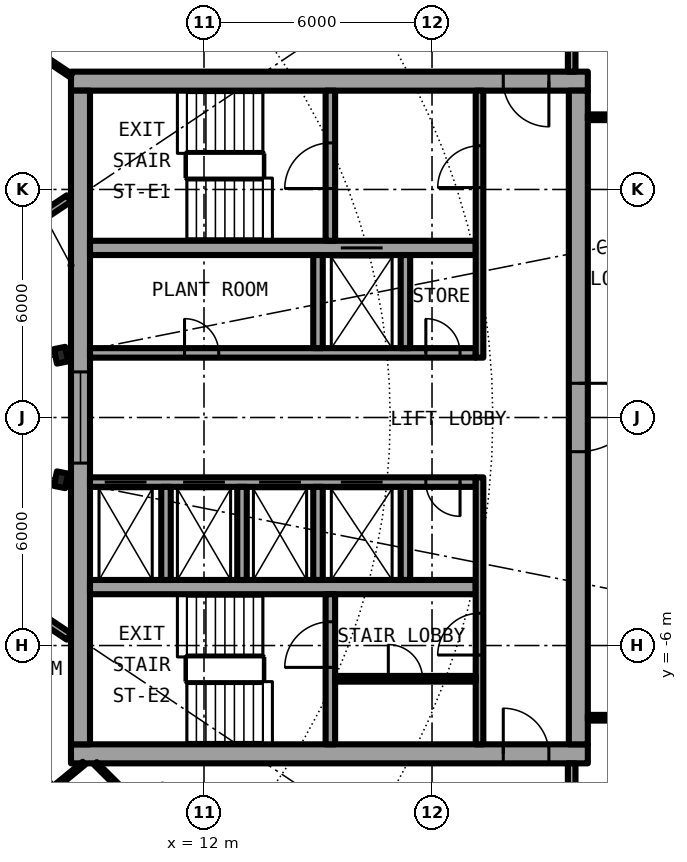
"""IFC4 building model, lengths in metres.
Left out: names, types, materials, properties, quantities, classifications, styles, units other than length and angle.
Written with IfcOpenShell. Run it as: python <this file> out.ifc"""

import sys

from ifc_helpers import new_model, si_unit, direction, frame, frame_2d, origin, origin_2d, place, context, subcontext, project, spatial, rectangle, i_section, extrude, element, fill, save


model = new_model("IFC4")
c1 = context("Model", 3, precision=1e-05, world=origin(), true_north=direction((0.0, 1.0)))
c2 = subcontext(c1, "Body", "Model", "MODEL_VIEW")
j1 = project(units=[si_unit("LENGTHUNIT", "METRE"), si_unit("PLANEANGLEUNIT", "RADIAN")], contexts=[c1])
p1 = place(None, origin())
s1 = spatial("IfcSite", under=j1, at=p1, CompositionType="ELEMENT")
p2 = place(p1, origin())
s2 = spatial("IfcBuilding", under=s1, at=p2, CompositionType="ELEMENT")
p3 = place(p2, frame((0.0, 0.0, 145.2)))
s3 = spatial("IfcBuildingStorey", under=s2, at=p3, CompositionType="ELEMENT", Elevation=145.2)
for number, where, z_axis, x_axis in (
    (1, (8.239, 1.639, 0.0), (0.0, 0.0, 1.0), (0.981, 0.195, 0.0)),
    (2, (8.239, -1.639, 0.0), (0.0, 0.0, 1.0), (0.981, -0.195, 0.0)),
):
    element("IfcColumn", number, at=place(p3, frame(where, z_axis=z_axis, x_axis=x_axis)), inside=s3, PredefinedType="COLUMN", context=c2, shape_type="SweptSolid", body=[
        extrude(i_section(OverallWidth=0.3, OverallDepth=0.39, WebThickness=0.011, FlangeThickness=0.019, FilletRadius=0.027, at=origin_2d()), origin(), (0.0, 0.0, 1.0), 3.05),
    ])
p4 = place(p3, frame((22.1, 8.85, 0.0), z_axis=(0.0, 0.0, 1.0), x_axis=(-1.0, 0.0, 0.0)))
e3 = element("IfcWall", 3, at=p4, inside=s3, PredefinedType="SHEAR", context=c2, shape_type="SweptSolid", body=[
    extrude(rectangle(XDim=13.6, YDim=0.5, at=frame_2d((6.8, 0.0))), origin(), (0.0, 0.0, 1.0), 3.05),
])
p5 = place(p4, frame((1.025, 0.0, 0.0)))
e4 = element("IfcOpeningElement", 4, at=p5, cuts=e3, PredefinedType="OPENING", context=c2, shape_type="SweptSolid", body=[
    extrude(rectangle(XDim=1.2, YDim=2.3, at=frame_2d((0.6, 1.15))), frame((0.0, 0.26, 0.0), z_axis=(0.0, -1.0, 0.0), x_axis=(1.0, 0.0, 0.0)), (0.0, 0.0, 1.0), 0.52),
])
p6 = place(p3, frame((8.5, -8.85, 0.0), z_axis=(0.0, 0.0, 1.0), x_axis=(1.0, 0.0, 0.0)))
e5 = element("IfcWall", 5, at=p6, inside=s3, PredefinedType="SHEAR", context=c2, shape_type="SweptSolid", body=[
    extrude(rectangle(XDim=13.6, YDim=0.5, at=frame_2d((6.8, 0.0))), origin(), (0.0, 0.0, 1.0), 3.05),
])
p7 = place(p6, frame((11.375, 0.0, 0.0)))
e6 = element("IfcOpeningElement", 6, at=p7, cuts=e5, PredefinedType="OPENING", context=c2, shape_type="SweptSolid", body=[
    extrude(rectangle(XDim=1.2, YDim=2.3, at=frame_2d((0.6, 1.15))), frame((0.0, 0.26, 0.0), z_axis=(0.0, -1.0, 0.0), x_axis=(1.0, 0.0, 0.0)), (0.0, 0.0, 1.0), 0.52),
])
p8 = place(p3, frame((21.85, 8.6, 0.0), z_axis=(0.0, 0.0, 1.0), x_axis=(0.0, -1.0, 0.0)))
e7 = element("IfcWall", 7, at=p8, inside=s3, PredefinedType="SHEAR", context=c2, shape_type="SweptSolid", body=[
    extrude(rectangle(XDim=17.2, YDim=0.5, at=frame_2d((8.6, 0.0))), origin(), (0.0, 0.0, 1.0), 3.05),
])
p9 = place(p8, frame((7.7, 0.0, 0.0)))
e8 = element("IfcOpeningElement", 8, at=p9, cuts=e7, PredefinedType="OPENING", context=c2, shape_type="SweptSolid", body=[
    extrude(rectangle(XDim=1.8, YDim=2.3, at=frame_2d((0.9, 1.15))), frame((0.0, 0.26, 0.0), z_axis=(0.0, -1.0, 0.0), x_axis=(1.0, 0.0, 0.0)), (0.0, 0.0, 1.0), 0.52),
])
p10 = place(p3, frame((8.75, -8.6, 0.0), z_axis=(0.0, 0.0, 1.0), x_axis=(0.0, 1.0, 0.0)))
e9 = element("IfcWall", 9, at=p10, inside=s3, PredefinedType="SHEAR", context=c2, shape_type="SweptSolid", body=[
    extrude(rectangle(XDim=17.2, YDim=0.5, at=frame_2d((8.6, 0.0))), origin(), (0.0, 0.0, 1.0), 3.05),
])
p11 = place(p10, frame((7.4, 0.0, 0.1)))
e10 = element("IfcOpeningElement", 10, at=p11, cuts=e9, PredefinedType="OPENING", context=c2, shape_type="SweptSolid", body=[
    extrude(rectangle(XDim=2.4, YDim=2.2, at=frame_2d((1.2, 1.1))), frame((0.0, 0.26, 0.0), z_axis=(0.0, -1.0, 0.0), x_axis=(1.0, 0.0, 0.0)), (0.0, 0.0, 1.0), 0.52),
])
p12 = place(p3, frame((9.0, 1.7, 0.0), z_axis=(0.0, 0.0, 1.0), x_axis=(1.0, 0.0, 0.0)))
e11 = element("IfcWall", 11, at=p12, inside=s3, PredefinedType="SHEAR", context=c2, shape_type="SweptSolid", body=[
    extrude(rectangle(XDim=10.15, YDim=0.25, at=frame_2d((5.075, 0.0))), origin(), (0.0, 0.0, 1.0), 3.05),
])
p13 = place(p12, frame((2.488, 0.0, 0.0)))
e12 = element("IfcOpeningElement", 12, at=p13, cuts=e11, PredefinedType="OPENING", context=c2, shape_type="SweptSolid", body=[
    extrude(rectangle(XDim=0.9, YDim=2.3, at=frame_2d((0.45, 1.15))), frame((0.0, 0.135, 0.0), z_axis=(0.0, -1.0, 0.0), x_axis=(1.0, 0.0, 0.0)), (0.0, 0.0, 1.0), 0.27),
])
p14 = place(p12, frame((8.837, 0.0, 0.0)))
e13 = element("IfcOpeningElement", 13, at=p14, cuts=e11, PredefinedType="OPENING", context=c2, shape_type="SweptSolid", body=[
    extrude(rectangle(XDim=0.9, YDim=2.3, at=frame_2d((0.45, 1.15))), frame((0.0, 0.135, 0.0), z_axis=(0.0, -1.0, 0.0), x_axis=(1.0, 0.0, 0.0)), (0.0, 0.0, 1.0), 0.27),
])
p15 = place(p3, frame((9.0, 4.462, 0.0), z_axis=(0.0, 0.0, 1.0), x_axis=(1.0, 0.0, 0.0)))
e14 = element("IfcWall", 14, at=p15, inside=s3, PredefinedType="SHEAR", context=c2, shape_type="SweptSolid", body=[
    extrude(rectangle(XDim=10.15, YDim=0.375, at=frame_2d((5.075, 0.0))), origin(), (0.0, 0.0, 1.0), 3.05),
])
p16 = place(p15, frame((6.6, 0.0, 0.0)))
e15 = element("IfcOpeningElement", 15, at=p16, cuts=e14, PredefinedType="OPENING", context=c2, shape_type="SweptSolid", body=[
    extrude(rectangle(XDim=1.1, YDim=2.3, at=frame_2d((0.55, 1.15))), frame((0.0, 0.198, 0.0), z_axis=(0.0, -1.0, 0.0), x_axis=(1.0, 0.0, 0.0)), (0.0, 0.0, 1.0), 0.395),
])
p17 = place(p3, frame((15.325, 4.65, 0.0), z_axis=(0.0, 0.0, 1.0), x_axis=(0.0, 1.0, 0.0)))
e16 = element("IfcWall", 16, at=p17, inside=s3, PredefinedType="SHEAR", context=c2, shape_type="SweptSolid", body=[
    extrude(rectangle(XDim=3.95, YDim=0.25, at=frame_2d((1.975, 0.0))), origin(), (0.0, 0.0, 1.0), 3.05),
])
p18 = place(p17, frame((1.375, 0.0, 0.0)))
e17 = element("IfcOpeningElement", 17, at=p18, cuts=e16, PredefinedType="OPENING", context=c2, shape_type="SweptSolid", body=[
    extrude(rectangle(XDim=1.2, YDim=2.3, at=frame_2d((0.6, 1.15))), frame((0.0, 0.135, 0.0), z_axis=(0.0, -1.0, 0.0), x_axis=(1.0, 0.0, 0.0)), (0.0, 0.0, 1.0), 0.27),
])
for number, where, z_axis, x_axis in (
    (18, (15.0, 1.825, 0.0), (0.0, 0.0, 1.0), (0.0, 1.0, 0.0)),
    (19, (17.3, 1.825, 0.0), (0.0, 0.0, 1.0), (0.0, 1.0, 0.0)),
):
    element("IfcWall", number, at=place(p3, frame(where, z_axis=z_axis, x_axis=x_axis)), inside=s3, PredefinedType="SOLIDWALL", context=c2, shape_type="SweptSolid", body=[
        extrude(rectangle(XDim=2.45, YDim=0.25, at=frame_2d((1.225, 0.0))), origin(), (0.0, 0.0, 1.0), 2.7),
    ])
p19 = place(p3, frame((19.25, 1.575, 0.0), z_axis=(0.0, 0.0, 1.0), x_axis=(0.0, 1.0, 0.0)))
e20 = element("IfcWall", 20, at=p19, inside=s3, PredefinedType="SOLIDWALL", context=c2, shape_type="SweptSolid", body=[
    extrude(rectangle(XDim=7.025, YDim=0.2, at=frame_2d((3.513, 0.0))), origin(), (0.0, 0.0, 1.0), 2.7),
])
p20 = place(p19, frame((4.475, 0.0, 0.0)))
e21 = element("IfcOpeningElement", 21, at=p20, cuts=e20, PredefinedType="OPENING", context=c2, shape_type="SweptSolid", body=[
    extrude(rectangle(XDim=1.1, YDim=2.3, at=frame_2d((0.55, 1.15))), frame((0.0, 0.11, 0.0), z_axis=(0.0, -1.0, 0.0), x_axis=(1.0, 0.0, 0.0)), (0.0, 0.0, 1.0), 0.22),
])
p21 = place(p3, frame((19.15, -1.7, 0.0), z_axis=(0.0, 0.0, 1.0), x_axis=(-1.0, 0.0, 0.0)))
e22 = element("IfcWall", 22, at=p21, inside=s3, PredefinedType="SHEAR", context=c2, shape_type="SweptSolid", body=[
    extrude(rectangle(XDim=10.15, YDim=0.25, at=frame_2d((5.075, 0.0))), origin(), (0.0, 0.0, 1.0), 3.05),
])
p22 = place(p21, frame((8.663, 0.0, 0.0)))
e23 = element("IfcOpeningElement", 23, at=p22, cuts=e22, PredefinedType="OPENING", context=c2, shape_type="SweptSolid", body=[
    extrude(rectangle(XDim=1.1, YDim=2.3, at=frame_2d((0.55, 1.15))), frame((0.0, 0.135, 0.0), z_axis=(0.0, -1.0, 0.0), x_axis=(1.0, 0.0, 0.0)), (0.0, 0.0, 1.0), 0.27),
])
p23 = place(p21, frame((6.6, 0.0, 0.0)))
e24 = element("IfcOpeningElement", 24, at=p23, cuts=e22, PredefinedType="OPENING", context=c2, shape_type="SweptSolid", body=[
    extrude(rectangle(XDim=1.1, YDim=2.3, at=frame_2d((0.55, 1.15))), frame((0.0, 0.135, 0.0), z_axis=(0.0, -1.0, 0.0), x_axis=(1.0, 0.0, 0.0)), (0.0, 0.0, 1.0), 0.27),
])
p24 = place(p21, frame((4.6, 0.0, 0.0)))
e25 = element("IfcOpeningElement", 25, at=p24, cuts=e22, PredefinedType="OPENING", context=c2, shape_type="SweptSolid", body=[
    extrude(rectangle(XDim=1.1, YDim=2.3, at=frame_2d((0.55, 1.15))), frame((0.0, 0.135, 0.0), z_axis=(0.0, -1.0, 0.0), x_axis=(1.0, 0.0, 0.0)), (0.0, 0.0, 1.0), 0.27),
])
p25 = place(p21, frame((2.45, 0.0, 0.0)))
e26 = element("IfcOpeningElement", 26, at=p25, cuts=e22, PredefinedType="OPENING", context=c2, shape_type="SweptSolid", body=[
    extrude(rectangle(XDim=1.1, YDim=2.3, at=frame_2d((0.55, 1.15))), frame((0.0, 0.135, 0.0), z_axis=(0.0, -1.0, 0.0), x_axis=(1.0, 0.0, 0.0)), (0.0, 0.0, 1.0), 0.27),
])
p26 = place(p21, frame((0.413, 0.0, 0.0)))
e27 = element("IfcOpeningElement", 27, at=p26, cuts=e22, PredefinedType="OPENING", context=c2, shape_type="SweptSolid", body=[
    extrude(rectangle(XDim=0.9, YDim=2.3, at=frame_2d((0.45, 1.15))), frame((0.0, 0.135, 0.0), z_axis=(0.0, -1.0, 0.0), x_axis=(1.0, 0.0, 0.0)), (0.0, 0.0, 1.0), 0.27),
])
p27 = place(p3, frame((9.0, -4.462, 0.0), z_axis=(0.0, 0.0, 1.0), x_axis=(1.0, 0.0, 0.0)))
e28 = element("IfcWall", 28, at=p27, inside=s3, PredefinedType="SHEAR", context=c2, shape_type="SweptSolid", body=[
    extrude(rectangle(XDim=10.15, YDim=0.375, at=frame_2d((5.075, 0.0))), origin(), (0.0, 0.0, 1.0), 3.05),
])
p28 = place(p3, frame((15.325, -8.6, 0.0), z_axis=(0.0, 0.0, 1.0), x_axis=(0.0, 1.0, 0.0)))
e29 = element("IfcWall", 29, at=p28, inside=s3, PredefinedType="SHEAR", context=c2, shape_type="SweptSolid", body=[
    extrude(rectangle(XDim=3.95, YDim=0.25, at=frame_2d((1.975, 0.0))), origin(), (0.0, 0.0, 1.0), 3.05),
])
p29 = place(p28, frame((2.025, 0.0, 0.0)))
e30 = element("IfcOpeningElement", 30, at=p29, cuts=e29, PredefinedType="OPENING", context=c2, shape_type="SweptSolid", body=[
    extrude(rectangle(XDim=1.2, YDim=2.3, at=frame_2d((0.6, 1.15))), frame((0.0, 0.135, 0.0), z_axis=(0.0, -1.0, 0.0), x_axis=(1.0, 0.0, 0.0)), (0.0, 0.0, 1.0), 0.27),
])
for number, where, z_axis, x_axis in (
    (31, (15.0, -1.825, 0.0), (0.0, 0.0, 1.0), (0.0, -1.0, 0.0)),
    (32, (17.3, -1.825, 0.0), (0.0, 0.0, 1.0), (0.0, -1.0, 0.0)),
):
    element("IfcWall", number, at=place(p3, frame(where, z_axis=z_axis, x_axis=x_axis)), inside=s3, PredefinedType="SOLIDWALL", context=c2, shape_type="SweptSolid", body=[
        extrude(rectangle(XDim=2.45, YDim=0.25, at=frame_2d((1.225, 0.0))), origin(), (0.0, 0.0, 1.0), 2.7),
    ])
p30 = place(p3, frame((19.25, -8.6, 0.0), z_axis=(0.0, 0.0, 1.0), x_axis=(0.0, 1.0, 0.0)))
e33 = element("IfcWall", 33, at=p30, inside=s3, PredefinedType="SOLIDWALL", context=c2, shape_type="SweptSolid", body=[
    extrude(rectangle(XDim=7.025, YDim=0.2, at=frame_2d((3.513, 0.0))), origin(), (0.0, 0.0, 1.0), 2.7),
])
p31 = place(p30, frame((2.35, 0.0, 0.0)))
e34 = element("IfcOpeningElement", 34, at=p31, cuts=e33, PredefinedType="OPENING", context=c2, shape_type="SweptSolid", body=[
    extrude(rectangle(XDim=1.1, YDim=2.3, at=frame_2d((0.55, 1.15))), frame((0.0, 0.11, 0.0), z_axis=(0.0, -1.0, 0.0), x_axis=(1.0, 0.0, 0.0)), (0.0, 0.0, 1.0), 0.22),
])
for number, where, z_axis, x_axis in (
    (35, (11.0, -1.825, 0.0), (0.0, 0.0, 1.0), (0.0, -1.0, 0.0)),
    (36, (13.0, -1.825, 0.0), (0.0, 0.0, 1.0), (0.0, -1.0, 0.0)),
):
    element("IfcWall", number, at=place(p3, frame(where, z_axis=z_axis, x_axis=x_axis)), inside=s3, PredefinedType="SOLIDWALL", context=c2, shape_type="SweptSolid", body=[
        extrude(rectangle(XDim=2.45, YDim=0.25, at=frame_2d((1.225, 0.0))), origin(), (0.0, 0.0, 1.0), 2.7),
    ])
p32 = place(p3, frame((15.45, -6.875, 0.0), z_axis=(0.0, 0.0, 1.0), x_axis=(1.0, 0.0, 0.0)))
e37 = element("IfcWall", 37, at=p32, inside=s3, PredefinedType="PARTITIONING", context=c2, shape_type="SweptSolid", body=[
    extrude(rectangle(XDim=3.7, YDim=0.15, at=frame_2d((1.85, 0.0))), origin(), (0.0, 0.0, 1.0), 2.7),
])
p33 = place(p32, frame((1.4, 0.0, 0.0)))
e38 = element("IfcOpeningElement", 38, at=p33, cuts=e37, PredefinedType="OPENING", context=c2, shape_type="SweptSolid", body=[
    extrude(rectangle(XDim=0.9, YDim=2.3, at=frame_2d((0.45, 1.15))), frame((0.0, 0.085, 0.0), z_axis=(0.0, -1.0, 0.0), x_axis=(1.0, 0.0, 0.0)), (0.0, 0.0, 1.0), 0.17),
])
for number, where, z_axis, x_axis in (
    (39, (22.1, -7.9, 0.0), (0.0, 0.0, 1.0), (1.0, 0.0, 0.0)),
    (40, (22.1, 7.9, 0.0), (0.0, 0.0, 1.0), (1.0, 0.0, 0.0)),
):
    element("IfcWall", number, at=place(p3, frame(where, z_axis=z_axis, x_axis=x_axis)), inside=s3, PredefinedType="PARTITIONING", context=c2, shape_type="SweptSolid", body=[
        extrude(rectangle(XDim=2.84, YDim=0.15, at=frame_2d((1.42, 0.0))), origin(), (0.0, 0.0, 1.0), 2.7),
    ])
for number, where, z_axis, x_axis in (
    (41, (21.675, -10.85, 0.0), (0.0, 0.0, 1.0), (0.0, 1.0, 0.0)),
    (42, (21.675, 9.1, 0.0), (0.0, 0.0, 1.0), (0.0, 1.0, 0.0)),
):
    element("IfcWall", number, at=place(p3, frame(where, z_axis=z_axis, x_axis=x_axis)), inside=s3, PredefinedType="PARTITIONING", context=c2, shape_type="SweptSolid", body=[
        extrude(rectangle(XDim=1.75, YDim=0.2, at=frame_2d((0.875, 0.0))), origin(), (0.0, 0.0, 1.0), 2.7),
    ])
p34 = place(p3, frame((8.016, -9.773, 0.0), z_axis=(0.0, 0.0, 1.0), x_axis=(0.7731800648, 0.634186555673, 0.0)))
e43 = element("IfcWall", 43, at=p34, inside=s3, PredefinedType="PARTITIONING", context=c2, shape_type="SweptSolid", body=[
    extrude(rectangle(XDim=1.064, YDim=0.1, at=frame_2d((0.532, 0.0))), origin(), (0.0, 0.0, 1.0), 2.7),
])
p35 = place(p3, frame((6.513, -4.472, 0.0), z_axis=(0.0, 0.0, 1.0), x_axis=(0.83133816625, -0.555766905579, 0.0)))
e44 = element("IfcWall", 44, at=p35, inside=s3, PredefinedType="PARTITIONING", context=c2, shape_type="SweptSolid", body=[
    extrude(rectangle(XDim=2.323, YDim=0.2, at=frame_2d((1.162, 0.0))), origin(), (0.0, 0.0, 1.0), 2.7),
])
p36 = place(p3, frame((4.898, -5.968, 0.0), z_axis=(0.0, 0.0, 1.0), x_axis=(0.634401778971, -0.773003481776, 0.0)))
e45 = element("IfcWall", 45, at=p36, inside=s3, PredefinedType="PARTITIONING", context=c2, shape_type="SweptSolid", body=[
    extrude(rectangle(XDim=4.92, YDim=0.1, at=frame_2d((2.46, 0.0))), origin(), (0.0, 0.0, 1.0), 2.7),
])
p37 = place(p36, frame((2.01, 0.0, 0.0)))
e46 = element("IfcOpeningElement", 46, at=p37, cuts=e45, PredefinedType="OPENING", context=c2, shape_type="SweptSolid", body=[
    extrude(rectangle(XDim=0.9, YDim=2.3, at=frame_2d((0.45, 1.15))), frame((0.0, 0.06, 0.0), z_axis=(0.0, -1.0, 0.0), x_axis=(1.0, 0.0, 0.0)), (0.0, 0.0, 1.0), 0.12),
])
p38 = place(p3, frame((9.144, -9.104, 0.0), z_axis=(0.0, 0.0, 1.0), x_axis=(0.708793214553, -0.705416316088, 0.0)))
e47 = element("IfcWall", 47, at=p38, inside=s3, PredefinedType="PARTITIONING", context=c2, shape_type="SweptSolid", body=[
    extrude(rectangle(XDim=4.121, YDim=0.1, at=frame_2d((2.061, 0.0))), origin(), (0.0, 0.0, 1.0), 2.7),
])
p39 = place(p38, frame((1.611, 0.0, 0.0)))
e48 = element("IfcOpeningElement", 48, at=p39, cuts=e47, PredefinedType="OPENING", context=c2, shape_type="SweptSolid", body=[
    extrude(rectangle(XDim=0.9, YDim=2.3, at=frame_2d((0.45, 1.15))), frame((0.0, 0.06, 0.0), z_axis=(0.0, -1.0, 0.0), x_axis=(1.0, 0.0, 0.0)), (0.0, 0.0, 1.0), 0.12),
])
p40 = place(p3, frame((6.513, 4.472, 0.0), z_axis=(0.0, 0.0, 1.0), x_axis=(0.83133816625, 0.555766905579, 0.0)))
e49 = element("IfcWall", 49, at=p40, inside=s3, PredefinedType="PARTITIONING", context=c2, shape_type="SweptSolid", body=[
    extrude(rectangle(XDim=2.323, YDim=0.2, at=frame_2d((1.162, 0.0))), origin(), (0.0, 0.0, 1.0), 2.7),
])
p41 = place(p3, frame((5.731, 10.848, 0.0), z_axis=(0.0, 0.0, 1.0), x_axis=(0.831339441646, -0.555764997786, 0.0)))
e50 = element("IfcWall", 50, at=p41, inside=s3, PredefinedType="PARTITIONING", context=c2, shape_type="SweptSolid", body=[
    extrude(rectangle(XDim=3.332, YDim=0.1, at=frame_2d((1.666, 0.0))), origin(), (0.0, 0.0, 1.0), 2.7),
])
p42 = place(p16, origin())
e51 = element("IfcDoor", 51, at=p42, inside=s3, OperationType="DOUBLE_DOOR_SLIDING", PredefinedType="DOOR", context=c2, shape_type="SweptSolid", body=[
    extrude(rectangle(XDim=1.1, YDim=2.3, at=frame_2d((0.55, 1.15))), frame((0.0, 0.025, 0.0), z_axis=(0.0, -1.0, 0.0), x_axis=(1.0, 0.0, 0.0)), (0.0, 0.0, 1.0), 0.05),
])
fill(e15, e51)
p43 = place(p22, origin())
e52 = element("IfcDoor", 52, at=p43, inside=s3, OperationType="DOUBLE_DOOR_SLIDING", PredefinedType="DOOR", context=c2, shape_type="SweptSolid", body=[
    extrude(rectangle(XDim=1.1, YDim=2.3, at=frame_2d((0.55, 1.15))), frame((0.0, 0.025, 0.0), z_axis=(0.0, -1.0, 0.0), x_axis=(1.0, 0.0, 0.0)), (0.0, 0.0, 1.0), 0.05),
])
fill(e23, e52)
p44 = place(p23, origin())
e53 = element("IfcDoor", 53, at=p44, inside=s3, OperationType="DOUBLE_DOOR_SLIDING", PredefinedType="DOOR", context=c2, shape_type="SweptSolid", body=[
    extrude(rectangle(XDim=1.1, YDim=2.3, at=frame_2d((0.55, 1.15))), frame((0.0, 0.025, 0.0), z_axis=(0.0, -1.0, 0.0), x_axis=(1.0, 0.0, 0.0)), (0.0, 0.0, 1.0), 0.05),
])
fill(e24, e53)
p45 = place(p24, origin())
e54 = element("IfcDoor", 54, at=p45, inside=s3, OperationType="DOUBLE_DOOR_SLIDING", PredefinedType="DOOR", context=c2, shape_type="SweptSolid", body=[
    extrude(rectangle(XDim=1.1, YDim=2.3, at=frame_2d((0.55, 1.15))), frame((0.0, 0.025, 0.0), z_axis=(0.0, -1.0, 0.0), x_axis=(1.0, 0.0, 0.0)), (0.0, 0.0, 1.0), 0.05),
])
fill(e25, e54)
p46 = place(p25, origin())
e55 = element("IfcDoor", 55, at=p46, inside=s3, OperationType="DOUBLE_DOOR_SLIDING", PredefinedType="DOOR", context=c2, shape_type="SweptSolid", body=[
    extrude(rectangle(XDim=1.1, YDim=2.3, at=frame_2d((0.55, 1.15))), frame((0.0, 0.025, 0.0), z_axis=(0.0, -1.0, 0.0), x_axis=(1.0, 0.0, 0.0)), (0.0, 0.0, 1.0), 0.05),
])
fill(e26, e55)
p47 = place(p13, origin())
e56 = element("IfcDoor", 56, at=p47, inside=s3, OperationType="SINGLE_SWING_RIGHT", PredefinedType="DOOR", context=c2, shape_type="SweptSolid", body=[
    extrude(rectangle(XDim=0.9, YDim=2.3, at=frame_2d((0.45, 1.15))), frame((0.0, 0.025, 0.0), z_axis=(0.0, -1.0, 0.0), x_axis=(1.0, 0.0, 0.0)), (0.0, 0.0, 1.0), 0.05),
])
fill(e12, e56)
p48 = place(p14, origin())
e57 = element("IfcDoor", 57, at=p48, inside=s3, OperationType="SINGLE_SWING_LEFT", PredefinedType="DOOR", context=c2, shape_type="SweptSolid", body=[
    extrude(rectangle(XDim=0.9, YDim=2.3, at=frame_2d((0.45, 1.15))), frame((0.0, 0.025, 0.0), z_axis=(0.0, -1.0, 0.0), x_axis=(1.0, 0.0, 0.0)), (0.0, 0.0, 1.0), 0.05),
])
fill(e13, e57)
p49 = place(p26, origin())
e58 = element("IfcDoor", 58, at=p49, inside=s3, OperationType="SINGLE_SWING_RIGHT", PredefinedType="DOOR", context=c2, shape_type="SweptSolid", body=[
    extrude(rectangle(XDim=0.9, YDim=2.3, at=frame_2d((0.45, 1.15))), frame((0.0, 0.025, 0.0), z_axis=(0.0, -1.0, 0.0), x_axis=(1.0, 0.0, 0.0)), (0.0, 0.0, 1.0), 0.05),
])
fill(e27, e58)
p50 = place(p33, origin())
e59 = element("IfcDoor", 59, at=p50, inside=s3, OperationType="SINGLE_SWING_LEFT", PredefinedType="DOOR", context=c2, shape_type="SweptSolid", body=[
    extrude(rectangle(XDim=0.9, YDim=2.3, at=frame_2d((0.45, 1.15))), frame((0.0, 0.025, 0.0), z_axis=(0.0, -1.0, 0.0), x_axis=(1.0, 0.0, 0.0)), (0.0, 0.0, 1.0), 0.05),
])
fill(e38, e59)
p51 = place(p18, origin())
e60 = element("IfcDoor", 60, at=p51, inside=s3, OperationType="SINGLE_SWING_LEFT", PredefinedType="DOOR", context=c2, shape_type="SweptSolid", body=[
    extrude(rectangle(XDim=1.2, YDim=2.3, at=frame_2d((0.6, 1.15))), frame((0.0, 0.025, 0.0), z_axis=(0.0, -1.0, 0.0), x_axis=(1.0, 0.0, 0.0)), (0.0, 0.0, 1.0), 0.05),
])
fill(e17, e60)
p52 = place(p29, origin())
e61 = element("IfcDoor", 61, at=p52, inside=s3, OperationType="SINGLE_SWING_LEFT", PredefinedType="DOOR", context=c2, shape_type="SweptSolid", body=[
    extrude(rectangle(XDim=1.2, YDim=2.3, at=frame_2d((0.6, 1.15))), frame((0.0, 0.025, 0.0), z_axis=(0.0, -1.0, 0.0), x_axis=(1.0, 0.0, 0.0)), (0.0, 0.0, 1.0), 0.05),
])
fill(e30, e61)
p53 = place(p20, origin())
e62 = element("IfcDoor", 62, at=p53, inside=s3, OperationType="SINGLE_SWING_LEFT", PredefinedType="DOOR", context=c2, shape_type="SweptSolid", body=[
    extrude(rectangle(XDim=1.1, YDim=2.3, at=frame_2d((0.55, 1.15))), frame((0.0, 0.025, 0.0), z_axis=(0.0, -1.0, 0.0), x_axis=(1.0, 0.0, 0.0)), (0.0, 0.0, 1.0), 0.05),
])
fill(e21, e62)
p54 = place(p31, origin())
e63 = element("IfcDoor", 63, at=p54, inside=s3, OperationType="SINGLE_SWING_RIGHT", PredefinedType="DOOR", context=c2, shape_type="SweptSolid", body=[
    extrude(rectangle(XDim=1.1, YDim=2.3, at=frame_2d((0.55, 1.15))), frame((0.0, 0.025, 0.0), z_axis=(0.0, -1.0, 0.0), x_axis=(1.0, 0.0, 0.0)), (0.0, 0.0, 1.0), 0.05),
])
fill(e34, e63)
p55 = place(p5, origin())
e64 = element("IfcDoor", 64, at=p55, inside=s3, OperationType="SINGLE_SWING_RIGHT", PredefinedType="DOOR", context=c2, shape_type="SweptSolid", body=[
    extrude(rectangle(XDim=1.2, YDim=2.3, at=frame_2d((0.6, 1.15))), frame((0.0, 0.025, 0.0), z_axis=(0.0, -1.0, 0.0), x_axis=(1.0, 0.0, 0.0)), (0.0, 0.0, 1.0), 0.05),
])
fill(e4, e64)
p56 = place(p7, origin())
e65 = element("IfcDoor", 65, at=p56, inside=s3, OperationType="SINGLE_SWING_LEFT", PredefinedType="DOOR", context=c2, shape_type="SweptSolid", body=[
    extrude(rectangle(XDim=1.2, YDim=2.3, at=frame_2d((0.6, 1.15))), frame((0.0, 0.025, 0.0), z_axis=(0.0, -1.0, 0.0), x_axis=(1.0, 0.0, 0.0)), (0.0, 0.0, 1.0), 0.05),
])
fill(e6, e65)
p57 = place(p9, origin())
e66 = element("IfcDoor", 66, at=p57, inside=s3, OperationType="SINGLE_SWING_LEFT", PredefinedType="DOOR", context=c2, shape_type="SweptSolid", body=[
    extrude(rectangle(XDim=1.8, YDim=2.3, at=frame_2d((0.9, 1.15))), frame((0.0, 0.025, 0.0), z_axis=(0.0, -1.0, 0.0), x_axis=(1.0, 0.0, 0.0)), (0.0, 0.0, 1.0), 0.05),
])
fill(e8, e66)
p58 = place(p11, origin())
e67 = element("IfcWindow", 67, at=p58, inside=s3, PartitioningType="SINGLE_PANEL", PredefinedType="WINDOW", context=c2, shape_type="SweptSolid", body=[
    extrude(rectangle(XDim=2.4, YDim=2.2, at=frame_2d((1.2, 1.1))), frame((0.0, 0.03, 0.0), z_axis=(0.0, -1.0, 0.0), x_axis=(1.0, 0.0, 0.0)), (0.0, 0.0, 1.0), 0.06),
])
fill(e10, e67)
save(model, sys.argv[1])
